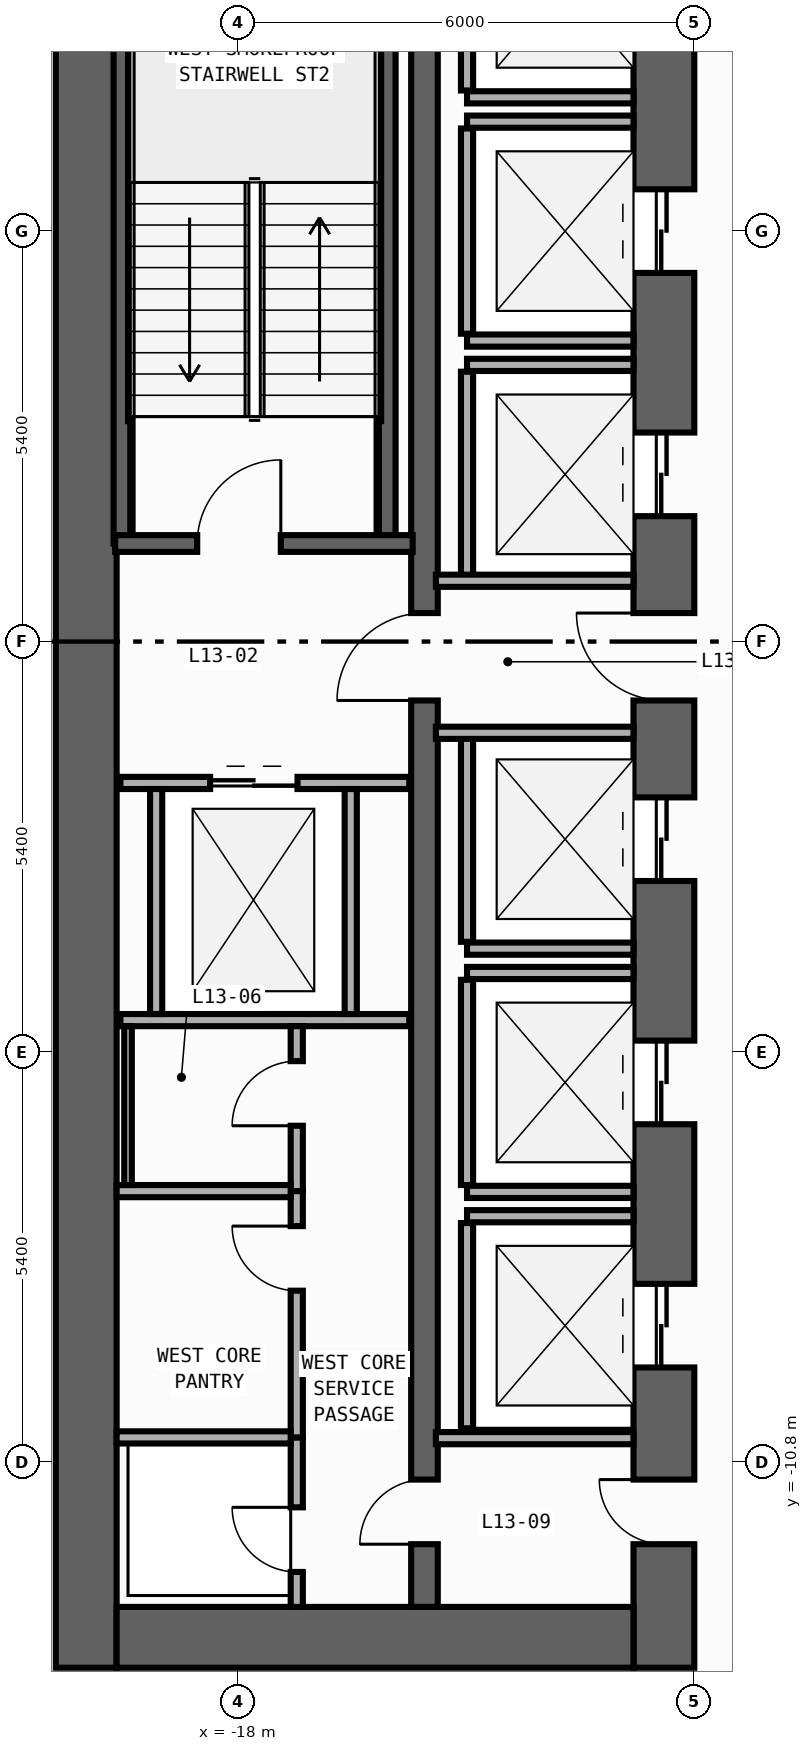
"""IFC4 building model, lengths in metres.
Left out: names, types, materials, properties, quantities, classifications, styles, units other than length and angle.
Written with IfcOpenShell. Run it as: python <this file> out.ifc"""

import sys

from ifc_helpers import new_model, si_unit, direction, frame, frame_2d, origin, place, context, subcontext, project, spatial, rectangle, extrude, element, fill, save


model = new_model("IFC4")
c1 = context("Model", 3, precision=1e-05, world=origin(), true_north=direction((0.0, 1.0)))
c2 = subcontext(c1, "Body", "Model", "MODEL_VIEW")
j1 = project(units=[si_unit("LENGTHUNIT", "METRE"), si_unit("PLANEANGLEUNIT", "RADIAN")], contexts=[c1])
p1 = place(None, origin())
s1 = spatial("IfcSite", under=j1, at=p1, CompositionType="ELEMENT")
p2 = place(p1, origin())
s2 = spatial("IfcBuilding", under=s1, at=p2, CompositionType="ELEMENT")
p3 = place(p2, frame((0.0, 0.0, 55.4)))
s3 = spatial("IfcBuildingStorey", under=s2, at=p3, CompositionType="ELEMENT", Elevation=55.4)
p4 = place(p3, frame((-20.0, -13.5, 0.0), z_axis=(0.0, 0.0, 1.0), x_axis=(0.0, 1.0, 0.0)))
e1 = element("IfcWall", 1, at=p4, inside=s3, PredefinedType="SHEAR", context=c2, shape_type="SweptSolid", body=[
    extrude(rectangle(XDim=27.0, YDim=0.8, at=frame_2d((13.5, 0.0))), origin(), (0.0, 0.0, 1.0), 3.94),
])
p5 = place(p3, frame((-12.4, -13.5, 0.0), z_axis=(0.0, 0.0, 1.0), x_axis=(0.0, 1.0, 0.0)))
e2 = element("IfcWall", 2, at=p5, inside=s3, PredefinedType="SHEAR", context=c2, shape_type="SweptSolid", body=[
    extrude(rectangle(XDim=27.0, YDim=0.8, at=frame_2d((13.5, 0.0))), origin(), (0.0, 0.0, 1.0), 3.94),
])
p6 = place(p5, frame((21.55, 0.0, 0.0)))
e3 = element("IfcOpeningElement", 3, at=p6, cuts=e2, PredefinedType="OPENING", context=c2, shape_type="SweptSolid", body=[
    extrude(rectangle(XDim=1.1, YDim=2.2, at=frame_2d((0.55, 1.1))), frame((0.0, 0.41, 0.0), z_axis=(0.0, -1.0, 0.0), x_axis=(1.0, 0.0, 0.0)), (0.0, 0.0, 1.0), 0.82),
])
p7 = place(p5, frame((18.35, 0.0, 0.0)))
e4 = element("IfcOpeningElement", 4, at=p7, cuts=e2, PredefinedType="OPENING", context=c2, shape_type="SweptSolid", body=[
    extrude(rectangle(XDim=1.1, YDim=2.2, at=frame_2d((0.55, 1.1))), frame((0.0, 0.41, 0.0), z_axis=(0.0, -1.0, 0.0), x_axis=(1.0, 0.0, 0.0)), (0.0, 0.0, 1.0), 0.82),
])
p8 = place(p5, frame((15.15, 0.0, 0.0)))
e5 = element("IfcOpeningElement", 5, at=p8, cuts=e2, PredefinedType="OPENING", context=c2, shape_type="SweptSolid", body=[
    extrude(rectangle(XDim=1.1, YDim=2.2, at=frame_2d((0.55, 1.1))), frame((0.0, 0.41, 0.0), z_axis=(0.0, -1.0, 0.0), x_axis=(1.0, 0.0, 0.0)), (0.0, 0.0, 1.0), 0.82),
])
p9 = place(p5, frame((10.35, 0.0, 0.0)))
e6 = element("IfcOpeningElement", 6, at=p9, cuts=e2, PredefinedType="OPENING", context=c2, shape_type="SweptSolid", body=[
    extrude(rectangle(XDim=1.1, YDim=2.2, at=frame_2d((0.55, 1.1))), frame((0.0, 0.41, 0.0), z_axis=(0.0, -1.0, 0.0), x_axis=(1.0, 0.0, 0.0)), (0.0, 0.0, 1.0), 0.82),
])
p10 = place(p5, frame((7.15, 0.0, 0.0)))
e7 = element("IfcOpeningElement", 7, at=p10, cuts=e2, PredefinedType="OPENING", context=c2, shape_type="SweptSolid", body=[
    extrude(rectangle(XDim=1.1, YDim=2.2, at=frame_2d((0.55, 1.1))), frame((0.0, 0.41, 0.0), z_axis=(0.0, -1.0, 0.0), x_axis=(1.0, 0.0, 0.0)), (0.0, 0.0, 1.0), 0.82),
])
p11 = place(p5, frame((3.95, 0.0, 0.0)))
e8 = element("IfcOpeningElement", 8, at=p11, cuts=e2, PredefinedType="OPENING", context=c2, shape_type="SweptSolid", body=[
    extrude(rectangle(XDim=1.1, YDim=2.2, at=frame_2d((0.55, 1.1))), frame((0.0, 0.41, 0.0), z_axis=(0.0, -1.0, 0.0), x_axis=(1.0, 0.0, 0.0)), (0.0, 0.0, 1.0), 0.82),
])
p12 = place(p5, frame((12.725, 0.0, 0.0)))
e9 = element("IfcOpeningElement", 9, at=p12, cuts=e2, PredefinedType="OPENING", context=c2, shape_type="SweptSolid", body=[
    extrude(rectangle(XDim=1.15, YDim=2.2, at=frame_2d((0.575, 1.1))), frame((0.0, 0.41, 0.0), z_axis=(0.0, -1.0, 0.0), x_axis=(1.0, 0.0, 0.0)), (0.0, 0.0, 1.0), 0.82),
])
p13 = place(p5, frame((1.625, 0.0, 0.0)))
e10 = element("IfcOpeningElement", 10, at=p13, cuts=e2, PredefinedType="OPENING", context=c2, shape_type="SweptSolid", body=[
    extrude(rectangle(XDim=0.85, YDim=2.1, at=frame_2d((0.425, 1.05))), frame((0.0, 0.41, 0.0), z_axis=(0.0, -1.0, 0.0), x_axis=(1.0, 0.0, 0.0)), (0.0, 0.0, 1.0), 0.82),
])
p14 = place(p3, frame((-19.6, -13.1, 0.0), z_axis=(0.0, 0.0, 1.0), x_axis=(1.0, 0.0, 0.0)))
e11 = element("IfcWall", 11, at=p14, inside=s3, PredefinedType="SHEAR", context=c2, shape_type="SweptSolid", body=[
    extrude(rectangle(XDim=6.8, YDim=0.8, at=frame_2d((3.4, 0.0))), origin(), (0.0, 0.0, 1.0), 3.94),
])
p15 = place(p3, frame((-15.55, -12.7, 0.0), z_axis=(0.0, 0.0, 1.0), x_axis=(0.0, 1.0, 0.0)))
e12 = element("IfcWall", 12, at=p15, inside=s3, PredefinedType="SHEAR", context=c2, shape_type="SweptSolid", body=[
    extrude(rectangle(XDim=25.4, YDim=0.35, at=frame_2d((12.7, 0.0))), origin(), (0.0, 0.0, 1.0), 3.94),
])
p16 = place(p15, frame((11.925, 0.0, 0.0)))
e13 = element("IfcOpeningElement", 13, at=p16, cuts=e12, PredefinedType="OPENING", context=c2, shape_type="SweptSolid", body=[
    extrude(rectangle(XDim=1.15, YDim=2.2, at=frame_2d((0.575, 1.1))), frame((0.0, 0.185, 0.0), z_axis=(0.0, -1.0, 0.0), x_axis=(1.0, 0.0, 0.0)), (0.0, 0.0, 1.0), 0.37),
])
p17 = place(p15, frame((0.825, 0.0, 0.0)))
e14 = element("IfcOpeningElement", 14, at=p17, cuts=e12, PredefinedType="OPENING", context=c2, shape_type="SweptSolid", body=[
    extrude(rectangle(XDim=0.85, YDim=2.1, at=frame_2d((0.425, 1.05))), frame((0.0, 0.185, 0.0), z_axis=(0.0, -1.0, 0.0), x_axis=(1.0, 0.0, 0.0)), (0.0, 0.0, 1.0), 0.37),
])
for number, where, z_axis, x_axis in (
    (15, (-16.04, 1.29, 0.0), (0.0, 0.0, 1.0), (0.0, 1.0, 0.0)),
    (16, (-19.53, 1.29, 0.0), (0.0, 0.0, 1.0), (0.0, 1.0, 0.0)),
):
    element("IfcWall", number, at=place(p3, frame(where, z_axis=z_axis, x_axis=x_axis)), inside=s3, PredefinedType="SHEAR", context=c2, shape_type="SweptSolid", body=[
        extrude(rectangle(XDim=11.3, YDim=0.22, at=frame_2d((5.65, 0.0))), origin(), (0.0, 0.0, 1.0), 3.94),
    ])
p18 = place(p3, frame((-19.62, 1.29, 0.0), z_axis=(0.0, 0.0, 1.0), x_axis=(1.0, 0.0, 0.0)))
e17 = element("IfcWall", 17, at=p18, inside=s3, PredefinedType="SHEAR", context=c2, shape_type="SweptSolid", body=[
    extrude(rectangle(XDim=3.915, YDim=0.22, at=frame_2d((1.958, 0.0))), origin(), (0.0, 0.0, 1.0), 3.94),
])
p19 = place(p18, frame((1.08, 0.0, 0.0)))
e18 = element("IfcOpeningElement", 18, at=p19, cuts=e17, PredefinedType="OPENING", context=c2, shape_type="SweptSolid", body=[
    extrude(rectangle(XDim=1.1, YDim=2.2, at=frame_2d((0.55, 1.1))), frame((0.0, 0.12, 0.0), z_axis=(0.0, -1.0, 0.0), x_axis=(1.0, 0.0, 0.0)), (0.0, 0.0, 1.0), 0.24),
])
p20 = place(p3, frame((-14.99, 7.16, 0.0), z_axis=(0.0, 0.0, 1.0), x_axis=(1.0, 0.0, 0.0)))
e19 = element("IfcWall", 19, at=p20, inside=s3, PredefinedType="STANDARD", context=c2, shape_type="SweptSolid", body=[
    extrude(rectangle(XDim=2.19, YDim=0.16, at=frame_2d((1.095, 0.0))), origin(), (0.0, 0.0, 1.0), 3.94),
])
p21 = place(p3, frame((-14.99, 7.25, 0.0), z_axis=(0.0, 0.0, 1.0), x_axis=(0.0, 1.0, 0.0)))
e20 = element("IfcWall", 20, at=p21, inside=s3, PredefinedType="STANDARD", context=c2, shape_type="SweptSolid", body=[
    extrude(rectangle(XDim=2.7, YDim=0.16, at=frame_2d((1.35, 0.0))), origin(), (0.0, 0.0, 1.0), 3.94),
])
for number, where, z_axis, x_axis in (
    (21, (-14.99, 3.96, 0.0), (0.0, 0.0, 1.0), (1.0, 0.0, 0.0)),
    (22, (-14.99, 6.84, 0.0), (0.0, 0.0, 1.0), (1.0, 0.0, 0.0)),
):
    element("IfcWall", number, at=place(p3, frame(where, z_axis=z_axis, x_axis=x_axis)), inside=s3, PredefinedType="STANDARD", context=c2, shape_type="SweptSolid", body=[
        extrude(rectangle(XDim=2.19, YDim=0.16, at=frame_2d((1.095, 0.0))), origin(), (0.0, 0.0, 1.0), 3.94),
    ])
p22 = place(p3, frame((-14.99, 4.05, 0.0), z_axis=(0.0, 0.0, 1.0), x_axis=(0.0, 1.0, 0.0)))
e23 = element("IfcWall", 23, at=p22, inside=s3, PredefinedType="STANDARD", context=c2, shape_type="SweptSolid", body=[
    extrude(rectangle(XDim=2.7, YDim=0.16, at=frame_2d((1.35, 0.0))), origin(), (0.0, 0.0, 1.0), 3.94),
])
p23 = place(p3, frame((-14.99, 3.64, 0.0), z_axis=(0.0, 0.0, 1.0), x_axis=(1.0, 0.0, 0.0)))
e24 = element("IfcWall", 24, at=p23, inside=s3, PredefinedType="STANDARD", context=c2, shape_type="SweptSolid", body=[
    extrude(rectangle(XDim=2.19, YDim=0.16, at=frame_2d((1.095, 0.0))), origin(), (0.0, 0.0, 1.0), 3.94),
])
p24 = place(p3, frame((-14.99, 0.85, 0.0), z_axis=(0.0, 0.0, 1.0), x_axis=(0.0, 1.0, 0.0)))
e25 = element("IfcWall", 25, at=p24, inside=s3, PredefinedType="STANDARD", context=c2, shape_type="SweptSolid", body=[
    extrude(rectangle(XDim=2.7, YDim=0.16, at=frame_2d((1.35, 0.0))), origin(), (0.0, 0.0, 1.0), 3.94),
])
p25 = place(p3, frame((-14.99, -4.04, 0.0), z_axis=(0.0, 0.0, 1.0), x_axis=(1.0, 0.0, 0.0)))
e26 = element("IfcWall", 26, at=p25, inside=s3, PredefinedType="STANDARD", context=c2, shape_type="SweptSolid", body=[
    extrude(rectangle(XDim=2.19, YDim=0.16, at=frame_2d((1.095, 0.0))), origin(), (0.0, 0.0, 1.0), 3.94),
])
p26 = place(p3, frame((-14.99, -3.95, 0.0), z_axis=(0.0, 0.0, 1.0), x_axis=(0.0, 1.0, 0.0)))
e27 = element("IfcWall", 27, at=p26, inside=s3, PredefinedType="STANDARD", context=c2, shape_type="SweptSolid", body=[
    extrude(rectangle(XDim=2.7, YDim=0.16, at=frame_2d((1.35, 0.0))), origin(), (0.0, 0.0, 1.0), 3.94),
])
for number, where, z_axis, x_axis in (
    (28, (-14.99, -7.24, 0.0), (0.0, 0.0, 1.0), (1.0, 0.0, 0.0)),
    (29, (-14.99, -4.36, 0.0), (0.0, 0.0, 1.0), (1.0, 0.0, 0.0)),
):
    element("IfcWall", number, at=place(p3, frame(where, z_axis=z_axis, x_axis=x_axis)), inside=s3, PredefinedType="STANDARD", context=c2, shape_type="SweptSolid", body=[
        extrude(rectangle(XDim=2.19, YDim=0.16, at=frame_2d((1.095, 0.0))), origin(), (0.0, 0.0, 1.0), 3.94),
    ])
p27 = place(p3, frame((-14.99, -7.15, 0.0), z_axis=(0.0, 0.0, 1.0), x_axis=(0.0, 1.0, 0.0)))
e30 = element("IfcWall", 30, at=p27, inside=s3, PredefinedType="STANDARD", context=c2, shape_type="SweptSolid", body=[
    extrude(rectangle(XDim=2.7, YDim=0.16, at=frame_2d((1.35, 0.0))), origin(), (0.0, 0.0, 1.0), 3.94),
])
p28 = place(p3, frame((-14.99, -7.56, 0.0), z_axis=(0.0, 0.0, 1.0), x_axis=(1.0, 0.0, 0.0)))
e31 = element("IfcWall", 31, at=p28, inside=s3, PredefinedType="STANDARD", context=c2, shape_type="SweptSolid", body=[
    extrude(rectangle(XDim=2.19, YDim=0.16, at=frame_2d((1.095, 0.0))), origin(), (0.0, 0.0, 1.0), 3.94),
])
p29 = place(p3, frame((-14.99, -10.35, 0.0), z_axis=(0.0, 0.0, 1.0), x_axis=(0.0, 1.0, 0.0)))
e32 = element("IfcWall", 32, at=p29, inside=s3, PredefinedType="STANDARD", context=c2, shape_type="SweptSolid", body=[
    extrude(rectangle(XDim=2.7, YDim=0.16, at=frame_2d((1.35, 0.0))), origin(), (0.0, 0.0, 1.0), 3.94),
])
p30 = place(p3, frame((-19.55, -1.86, 0.0), z_axis=(0.0, 0.0, 1.0), x_axis=(1.0, 0.0, 0.0)))
e33 = element("IfcWall", 33, at=p30, inside=s3, PredefinedType="STANDARD", context=c2, shape_type="SweptSolid", body=[
    extrude(rectangle(XDim=3.8, YDim=0.16, at=frame_2d((1.9, 0.0))), origin(), (0.0, 0.0, 1.0), 3.94),
])
p31 = place(p30, frame((1.18, 0.0, 0.0)))
e34 = element("IfcOpeningElement", 34, at=p31, cuts=e33, PredefinedType="OPENING", context=c2, shape_type="SweptSolid", body=[
    extrude(rectangle(XDim=1.15, YDim=2.2, at=frame_2d((0.575, 1.1))), frame((0.0, 0.09, 0.0), z_axis=(0.0, -1.0, 0.0), x_axis=(1.0, 0.0, 0.0)), (0.0, 0.0, 1.0), 0.18),
])
p32 = place(p3, frame((-19.55, -4.98, 0.0), z_axis=(0.0, 0.0, 1.0), x_axis=(1.0, 0.0, 0.0)))
e35 = element("IfcWall", 35, at=p32, inside=s3, PredefinedType="STANDARD", context=c2, shape_type="SweptSolid", body=[
    extrude(rectangle(XDim=3.8, YDim=0.16, at=frame_2d((1.9, 0.0))), origin(), (0.0, 0.0, 1.0), 3.94),
])
for number, where, z_axis, x_axis in (
    (36, (-19.08, -4.9, 0.0), (0.0, 0.0, 1.0), (0.0, 1.0, 0.0)),
    (37, (-16.52, -4.9, 0.0), (0.0, 0.0, 1.0), (0.0, 1.0, 0.0)),
):
    element("IfcWall", number, at=place(p3, frame(where, z_axis=z_axis, x_axis=x_axis)), inside=s3, PredefinedType="STANDARD", context=c2, shape_type="SweptSolid", body=[
        extrude(rectangle(XDim=2.96, YDim=0.16, at=frame_2d((1.48, 0.0))), origin(), (0.0, 0.0, 1.0), 3.94),
    ])
for number, where, z_axis, x_axis in (
    (38, (-15.4, 0.8, 0.0), (0.0, 0.0, 1.0), (1.0, 0.0, 0.0)),
    (39, (-15.4, -1.2, 0.0), (0.0, 0.0, 1.0), (1.0, 0.0, 0.0)),
    (40, (-15.4, -10.48, 0.0), (0.0, 0.0, 1.0), (1.0, 0.0, 0.0)),
):
    element("IfcWall", number, at=place(p3, frame(where, z_axis=z_axis, x_axis=x_axis)), inside=s3, PredefinedType="STANDARD", context=c2, shape_type="SweptSolid", body=[
        extrude(rectangle(XDim=2.6, YDim=0.16, at=frame_2d((1.3, 0.0))), origin(), (0.0, 0.0, 1.0), 3.94),
    ])
p33 = place(p3, frame((-17.23, -12.7, 0.0), z_axis=(0.0, 0.0, 1.0), x_axis=(0.0, 1.0, 0.0)))
e41 = element("IfcWall", 41, at=p33, inside=s3, PredefinedType="PARTITIONING", context=c2, shape_type="SweptSolid", body=[
    extrude(rectangle(XDim=2.23, YDim=0.16, at=frame_2d((1.115, 0.0))), origin(), (0.0, 0.0, 1.0), 3.94),
])
p34 = place(p33, frame((0.46, 0.0, 0.0)))
e42 = element("IfcOpeningElement", 42, at=p34, cuts=e41, PredefinedType="OPENING", context=c2, shape_type="SweptSolid", body=[
    extrude(rectangle(XDim=0.85, YDim=2.1, at=frame_2d((0.425, 1.05))), frame((0.0, 0.09, 0.0), z_axis=(0.0, -1.0, 0.0), x_axis=(1.0, 0.0, 0.0)), (0.0, 0.0, 1.0), 0.18),
])
p35 = place(p3, frame((-17.23, -7.23, 0.0), z_axis=(0.0, 0.0, 1.0), x_axis=(0.0, 1.0, 0.0)))
e43 = element("IfcWall", 43, at=p35, inside=s3, PredefinedType="PARTITIONING", context=c2, shape_type="SweptSolid", body=[
    extrude(rectangle(XDim=2.17, YDim=0.16, at=frame_2d((1.085, 0.0))), origin(), (0.0, 0.0, 1.0), 3.94),
])
p36 = place(p35, frame((0.86, 0.0, 0.0)))
e44 = element("IfcOpeningElement", 44, at=p36, cuts=e43, PredefinedType="OPENING", context=c2, shape_type="SweptSolid", body=[
    extrude(rectangle(XDim=0.85, YDim=2.1, at=frame_2d((0.425, 1.05))), frame((0.0, 0.09, 0.0), z_axis=(0.0, -1.0, 0.0), x_axis=(1.0, 0.0, 0.0)), (0.0, 0.0, 1.0), 0.18),
])
p37 = place(p3, frame((-17.23, -10.47, 0.0), z_axis=(0.0, 0.0, 1.0), x_axis=(0.0, 1.0, 0.0)))
e45 = element("IfcWall", 45, at=p37, inside=s3, PredefinedType="PARTITIONING", context=c2, shape_type="SweptSolid", body=[
    extrude(rectangle(XDim=3.24, YDim=0.16, at=frame_2d((1.62, 0.0))), origin(), (0.0, 0.0, 1.0), 3.94),
])
p38 = place(p37, frame((1.93, 0.0, 0.0)))
e46 = element("IfcOpeningElement", 46, at=p38, cuts=e45, PredefinedType="OPENING", context=c2, shape_type="SweptSolid", body=[
    extrude(rectangle(XDim=0.85, YDim=2.1, at=frame_2d((0.425, 1.05))), frame((0.0, 0.09, 0.0), z_axis=(0.0, -1.0, 0.0), x_axis=(1.0, 0.0, 0.0)), (0.0, 0.0, 1.0), 0.18),
])
for number, where, z_axis, x_axis in (
    (47, (-19.6, -10.47, 0.0), (0.0, 0.0, 1.0), (1.0, 0.0, 0.0)),
    (48, (-19.6, -7.23, 0.0), (0.0, 0.0, 1.0), (1.0, 0.0, 0.0)),
):
    element("IfcWall", number, at=place(p3, frame(where, z_axis=z_axis, x_axis=x_axis)), inside=s3, PredefinedType="PARTITIONING", context=c2, shape_type="SweptSolid", body=[
        extrude(rectangle(XDim=2.29, YDim=0.16, at=frame_2d((1.145, 0.0))), origin(), (0.0, 0.0, 1.0), 3.94),
    ])
p39 = place(p3, frame((-19.45, -7.15, 0.0), z_axis=(0.0, 0.0, 1.0), x_axis=(0.0, 1.0, 0.0)))
e49 = element("IfcWall", 49, at=p39, inside=s3, PredefinedType="PARTITIONING", context=c2, shape_type="SweptSolid", body=[
    extrude(rectangle(XDim=2.09, YDim=0.1, at=frame_2d((1.045, 0.0))), origin(), (0.0, 0.0, 1.0), 3.94),
])
p40 = place(p19, origin())
e50 = element("IfcDoor", 50, at=p40, inside=s3, OperationType="SINGLE_SWING_RIGHT", PredefinedType="DOOR", context=c2, shape_type="SweptSolid", body=[
    extrude(rectangle(XDim=1.1, YDim=2.2, at=frame_2d((0.55, 1.1))), frame((0.0, 0.025, 0.0), z_axis=(0.0, -1.0, 0.0), x_axis=(1.0, 0.0, 0.0)), (0.0, 0.0, 1.0), 0.05),
])
fill(e18, e50)
p41 = place(p7, origin())
e51 = element("IfcDoor", 51, at=p41, inside=s3, OperationType="DOUBLE_DOOR_SLIDING", PredefinedType="DOOR", context=c2, shape_type="SweptSolid", body=[
    extrude(rectangle(XDim=1.1, YDim=2.2, at=frame_2d((0.55, 1.1))), frame((0.0, 0.025, 0.0), z_axis=(0.0, -1.0, 0.0), x_axis=(1.0, 0.0, 0.0)), (0.0, 0.0, 1.0), 0.05),
])
fill(e4, e51)
p42 = place(p8, origin())
e52 = element("IfcDoor", 52, at=p42, inside=s3, OperationType="DOUBLE_DOOR_SLIDING", PredefinedType="DOOR", context=c2, shape_type="SweptSolid", body=[
    extrude(rectangle(XDim=1.1, YDim=2.2, at=frame_2d((0.55, 1.1))), frame((0.0, 0.025, 0.0), z_axis=(0.0, -1.0, 0.0), x_axis=(1.0, 0.0, 0.0)), (0.0, 0.0, 1.0), 0.05),
])
fill(e5, e52)
p43 = place(p9, origin())
e53 = element("IfcDoor", 53, at=p43, inside=s3, OperationType="DOUBLE_DOOR_SLIDING", PredefinedType="DOOR", context=c2, shape_type="SweptSolid", body=[
    extrude(rectangle(XDim=1.1, YDim=2.2, at=frame_2d((0.55, 1.1))), frame((0.0, 0.025, 0.0), z_axis=(0.0, -1.0, 0.0), x_axis=(1.0, 0.0, 0.0)), (0.0, 0.0, 1.0), 0.05),
])
fill(e6, e53)
p44 = place(p10, origin())
e54 = element("IfcDoor", 54, at=p44, inside=s3, OperationType="DOUBLE_DOOR_SLIDING", PredefinedType="DOOR", context=c2, shape_type="SweptSolid", body=[
    extrude(rectangle(XDim=1.1, YDim=2.2, at=frame_2d((0.55, 1.1))), frame((0.0, 0.025, 0.0), z_axis=(0.0, -1.0, 0.0), x_axis=(1.0, 0.0, 0.0)), (0.0, 0.0, 1.0), 0.05),
])
fill(e7, e54)
p45 = place(p11, origin())
e55 = element("IfcDoor", 55, at=p45, inside=s3, OperationType="DOUBLE_DOOR_SLIDING", PredefinedType="DOOR", context=c2, shape_type="SweptSolid", body=[
    extrude(rectangle(XDim=1.1, YDim=2.2, at=frame_2d((0.55, 1.1))), frame((0.0, 0.025, 0.0), z_axis=(0.0, -1.0, 0.0), x_axis=(1.0, 0.0, 0.0)), (0.0, 0.0, 1.0), 0.05),
])
fill(e8, e55)
p46 = place(p12, origin())
e56 = element("IfcDoor", 56, at=p46, inside=s3, OperationType="SINGLE_SWING_RIGHT", PredefinedType="DOOR", context=c2, shape_type="SweptSolid", body=[
    extrude(rectangle(XDim=1.15, YDim=2.2, at=frame_2d((0.575, 1.1))), frame((0.0, 0.025, 0.0), z_axis=(0.0, -1.0, 0.0), x_axis=(1.0, 0.0, 0.0)), (0.0, 0.0, 1.0), 0.05),
])
fill(e9, e56)
p47 = place(p16, origin())
e57 = element("IfcDoor", 57, at=p47, inside=s3, OperationType="SINGLE_SWING_LEFT", PredefinedType="DOOR", context=c2, shape_type="SweptSolid", body=[
    extrude(rectangle(XDim=1.15, YDim=2.2, at=frame_2d((0.575, 1.1))), frame((0.0, 0.025, 0.0), z_axis=(0.0, -1.0, 0.0), x_axis=(1.0, 0.0, 0.0)), (0.0, 0.0, 1.0), 0.05),
])
fill(e13, e57)
p48 = place(p13, origin())
e58 = element("IfcDoor", 58, at=p48, inside=s3, OperationType="SINGLE_SWING_RIGHT", PredefinedType="DOOR", context=c2, shape_type="SweptSolid", body=[
    extrude(rectangle(XDim=0.85, YDim=2.1, at=frame_2d((0.425, 1.05))), frame((0.0, 0.025, 0.0), z_axis=(0.0, -1.0, 0.0), x_axis=(1.0, 0.0, 0.0)), (0.0, 0.0, 1.0), 0.05),
])
fill(e10, e58)
p49 = place(p17, origin())
e59 = element("IfcDoor", 59, at=p49, inside=s3, OperationType="SINGLE_SWING_LEFT", PredefinedType="DOOR", context=c2, shape_type="SweptSolid", body=[
    extrude(rectangle(XDim=0.85, YDim=2.1, at=frame_2d((0.425, 1.05))), frame((0.0, 0.025, 0.0), z_axis=(0.0, -1.0, 0.0), x_axis=(1.0, 0.0, 0.0)), (0.0, 0.0, 1.0), 0.05),
])
fill(e14, e59)
p50 = place(p31, origin())
e60 = element("IfcDoor", 60, at=p50, inside=s3, OperationType="DOUBLE_DOOR_SLIDING", PredefinedType="DOOR", context=c2, shape_type="SweptSolid", body=[
    extrude(rectangle(XDim=1.15, YDim=2.2, at=frame_2d((0.575, 1.1))), frame((0.0, 0.025, 0.0), z_axis=(0.0, -1.0, 0.0), x_axis=(1.0, 0.0, 0.0)), (0.0, 0.0, 1.0), 0.05),
])
fill(e34, e60)
p51 = place(p34, origin())
e61 = element("IfcDoor", 61, at=p51, inside=s3, OperationType="SINGLE_SWING_RIGHT", PredefinedType="DOOR", context=c2, shape_type="SweptSolid", body=[
    extrude(rectangle(XDim=0.85, YDim=2.1, at=frame_2d((0.425, 1.05))), frame((0.0, 0.025, 0.0), z_axis=(0.0, -1.0, 0.0), x_axis=(1.0, 0.0, 0.0)), (0.0, 0.0, 1.0), 0.05),
])
fill(e42, e61)
p52 = place(p36, origin())
e62 = element("IfcDoor", 62, at=p52, inside=s3, OperationType="SINGLE_SWING_LEFT", PredefinedType="DOOR", context=c2, shape_type="SweptSolid", body=[
    extrude(rectangle(XDim=0.85, YDim=2.1, at=frame_2d((0.425, 1.05))), frame((0.0, 0.025, 0.0), z_axis=(0.0, -1.0, 0.0), x_axis=(1.0, 0.0, 0.0)), (0.0, 0.0, 1.0), 0.05),
])
fill(e44, e62)
p53 = place(p38, origin())
e63 = element("IfcDoor", 63, at=p53, inside=s3, OperationType="SINGLE_SWING_RIGHT", PredefinedType="DOOR", context=c2, shape_type="SweptSolid", body=[
    extrude(rectangle(XDim=0.85, YDim=2.1, at=frame_2d((0.425, 1.05))), frame((0.0, 0.025, 0.0), z_axis=(0.0, -1.0, 0.0), x_axis=(1.0, 0.0, 0.0)), (0.0, 0.0, 1.0), 0.05),
])
fill(e46, e63)
save(model, sys.argv[1])
